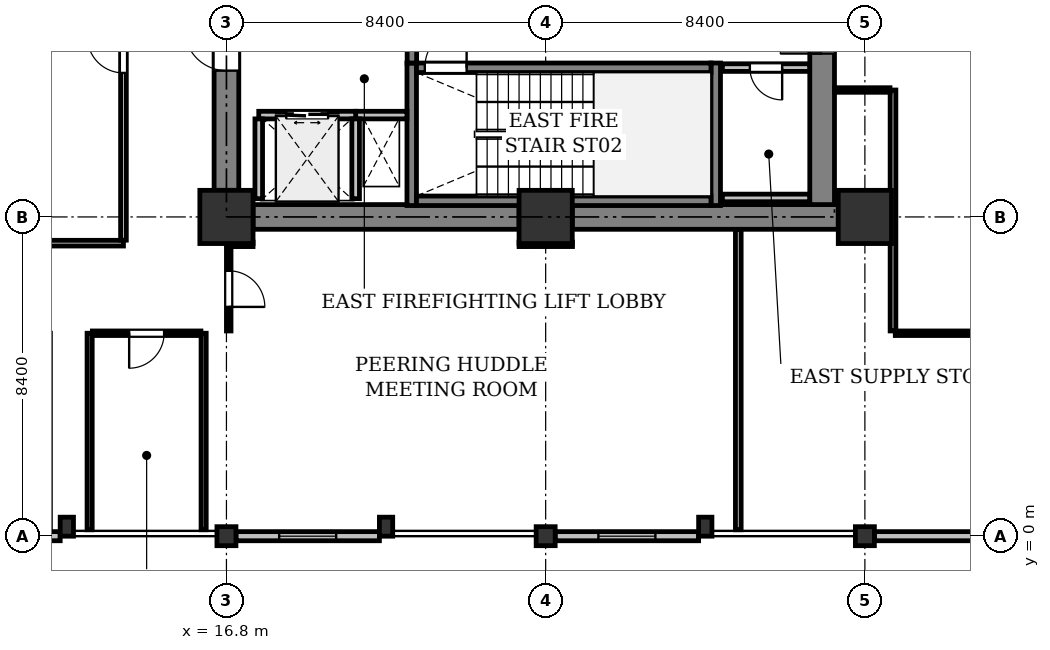
"""IFC4 building model, lengths in metres.
Left out: names, types, materials, properties, quantities, classifications, styles, units other than length and angle.
Written with IfcOpenShell. Run it as: python <this file> out.ifc"""

import sys

from ifc_helpers import new_model, si_unit, direction, frame, frame_2d, origin, origin_2d, place, context, subcontext, project, spatial, rectangle, i_section, extrude, element, fill, save


model = new_model("IFC4")
c1 = context("Model", 3, precision=1e-05, world=origin(), true_north=direction((0.0, 1.0)))
c2 = subcontext(c1, "Body", "Model", "MODEL_VIEW")
j1 = project(units=[si_unit("LENGTHUNIT", "METRE"), si_unit("PLANEANGLEUNIT", "RADIAN")], contexts=[c1])
p1 = place(None, origin())
s1 = spatial("IfcSite", under=j1, at=p1, CompositionType="ELEMENT")
p2 = place(p1, origin())
s2 = spatial("IfcBuilding", under=s1, at=p2, CompositionType="ELEMENT")
p3 = place(p2, frame((0.0, 0.0, 24.8)))
s3 = spatial("IfcBuildingStorey", under=s2, at=p3, CompositionType="ELEMENT", Elevation=24.8)
p4 = place(p3, frame((16.8, 0.0, 0.0), z_axis=(0.0, 0.0, 1.0), x_axis=(1.0, 0.0, 0.0)))
e1 = element("IfcColumn", 1, at=p4, inside=s3, PredefinedType="COLUMN", context=c2, shape_type="SweptSolid", body=[
    extrude(i_section(OverallWidth=0.5, OverallDepth=0.5, WebThickness=0.028, FlangeThickness=0.04, at=origin_2d()), origin(), (0.0, 0.0, 1.0), 4.2),
])
p5 = place(p3, frame((16.8, 8.4, 0.0), z_axis=(0.0, 0.0, 1.0), x_axis=(1.0, 0.0, 0.0)))
e2 = element("IfcColumn", 2, at=p5, inside=s3, PredefinedType="COLUMN", context=c2, shape_type="SweptSolid", body=[
    extrude(rectangle(XDim=1.4, YDim=1.4, at=origin_2d()), origin(), (0.0, 0.0, 1.0), 4.2),
])
p6 = place(p3, frame((25.2, 0.0, 0.0), z_axis=(0.0, 0.0, 1.0), x_axis=(1.0, 0.0, 0.0)))
e3 = element("IfcColumn", 3, at=p6, inside=s3, PredefinedType="COLUMN", context=c2, shape_type="SweptSolid", body=[
    extrude(i_section(OverallWidth=0.5, OverallDepth=0.5, WebThickness=0.028, FlangeThickness=0.04, at=origin_2d()), origin(), (0.0, 0.0, 1.0), 4.2),
])
p7 = place(p3, frame((25.2, 8.4, 0.0), z_axis=(0.0, 0.0, 1.0), x_axis=(1.0, 0.0, 0.0)))
e4 = element("IfcColumn", 4, at=p7, inside=s3, PredefinedType="COLUMN", context=c2, shape_type="SweptSolid", body=[
    extrude(rectangle(XDim=1.4, YDim=1.4, at=origin_2d()), origin(), (0.0, 0.0, 1.0), 4.2),
])
p8 = place(p3, frame((33.6, 0.0, 0.0), z_axis=(0.0, 0.0, 1.0), x_axis=(1.0, 0.0, 0.0)))
e5 = element("IfcColumn", 5, at=p8, inside=s3, PredefinedType="COLUMN", context=c2, shape_type="SweptSolid", body=[
    extrude(i_section(OverallWidth=0.5, OverallDepth=0.5, WebThickness=0.028, FlangeThickness=0.04, at=origin_2d()), origin(), (0.0, 0.0, 1.0), 4.2),
])
p9 = place(p3, frame((33.6, 8.4, 0.0), z_axis=(0.0, 0.0, 1.0), x_axis=(1.0, 0.0, 0.0)))
e6 = element("IfcColumn", 6, at=p9, inside=s3, PredefinedType="COLUMN", context=c2, shape_type="SweptSolid", body=[
    extrude(rectangle(XDim=1.4, YDim=1.4, at=origin_2d()), origin(), (0.0, 0.0, 1.0), 4.2),
])
for number, where, z_axis, x_axis in (
    (7, (12.6, 0.25, 0.0), (0.0, 0.0, 1.0), (1.0, 0.0, 0.0)),
    (8, (21.0, 0.25, 0.0), (0.0, 0.0, 1.0), (1.0, 0.0, 0.0)),
    (9, (29.4, 0.25, 0.0), (0.0, 0.0, 1.0), (1.0, 0.0, 0.0)),
):
    element("IfcColumn", number, at=place(p3, frame(where, z_axis=z_axis, x_axis=x_axis)), inside=s3, PredefinedType="PILASTER", context=c2, shape_type="SweptSolid", body=[
        extrude(rectangle(XDim=0.35, YDim=0.5, at=origin_2d()), origin(), (0.0, 0.0, 1.0), 4.2),
    ])
p10 = place(p3, frame((41.75, 0.0, 0.0), z_axis=(0.0, 0.0, 1.0), x_axis=(-1.0, 0.0, 0.0)))
e10 = element("IfcWall", 10, at=p10, inside=s3, PredefinedType="STANDARD", context=c2, shape_type="SweptSolid", body=[
    extrude(rectangle(XDim=7.9, YDim=0.24, at=frame_2d((3.95, 0.0))), origin(), (0.0, 0.0, 1.0), 3.471),
])
p11 = place(p10, frame((2.43, 0.0, 0.9)))
e11 = element("IfcOpeningElement", 11, at=p11, cuts=e10, PredefinedType="OPENING", context=c2, shape_type="SweptSolid", body=[
    extrude(rectangle(XDim=1.5, YDim=1.6, at=frame_2d((0.75, 0.8))), frame((0.0, 0.13, 0.0), z_axis=(0.0, -1.0, 0.0), x_axis=(1.0, 0.0, 0.0)), (0.0, 0.0, 1.0), 0.26),
])
p12 = place(p3, frame((29.225, 0.0, 0.0), z_axis=(0.0, 0.0, 1.0), x_axis=(-1.0, 0.0, 0.0)))
e12 = element("IfcWall", 12, at=p12, inside=s3, PredefinedType="STANDARD", context=c2, shape_type="SweptSolid", body=[
    extrude(rectangle(XDim=3.775, YDim=0.24, at=frame_2d((1.888, 0.0))), origin(), (0.0, 0.0, 1.0), 3.471),
])
p13 = place(p12, frame((1.137, 0.0, 0.9)))
e13 = element("IfcOpeningElement", 13, at=p13, cuts=e12, PredefinedType="OPENING", context=c2, shape_type="SweptSolid", body=[
    extrude(rectangle(XDim=1.5, YDim=1.6, at=frame_2d((0.75, 0.8))), frame((0.0, 0.13, 0.0), z_axis=(0.0, -1.0, 0.0), x_axis=(1.0, 0.0, 0.0)), (0.0, 0.0, 1.0), 0.26),
])
p14 = place(p3, frame((20.825, 0.0, 0.0), z_axis=(0.0, 0.0, 1.0), x_axis=(-1.0, 0.0, 0.0)))
e14 = element("IfcWall", 14, at=p14, inside=s3, PredefinedType="STANDARD", context=c2, shape_type="SweptSolid", body=[
    extrude(rectangle(XDim=3.775, YDim=0.24, at=frame_2d((1.887, 0.0))), origin(), (0.0, 0.0, 1.0), 3.471),
])
p15 = place(p14, frame((1.137, 0.0, 0.9)))
e15 = element("IfcOpeningElement", 15, at=p15, cuts=e14, PredefinedType="OPENING", context=c2, shape_type="SweptSolid", body=[
    extrude(rectangle(XDim=1.5, YDim=1.6, at=frame_2d((0.75, 0.8))), frame((0.0, 0.13, 0.0), z_axis=(0.0, -1.0, 0.0), x_axis=(1.0, 0.0, 0.0)), (0.0, 0.0, 1.0), 0.26),
])
p16 = place(p3, frame((12.425, 0.0, 0.0), z_axis=(0.0, 0.0, 1.0), x_axis=(-1.0, 0.0, 0.0)))
e16 = element("IfcWall", 16, at=p16, inside=s3, PredefinedType="STANDARD", context=c2, shape_type="SweptSolid", body=[
    extrude(rectangle(XDim=3.775, YDim=0.24, at=frame_2d((1.888, 0.0))), origin(), (0.0, 0.0, 1.0), 3.471),
])
p17 = place(p16, frame((1.137, 0.0, 0.9)))
e17 = element("IfcOpeningElement", 17, at=p17, cuts=e16, PredefinedType="OPENING", context=c2, shape_type="SweptSolid", body=[
    extrude(rectangle(XDim=1.5, YDim=1.6, at=frame_2d((0.75, 0.8))), frame((0.0, 0.13, 0.0), z_axis=(0.0, -1.0, 0.0), x_axis=(1.0, 0.0, 0.0)), (0.0, 0.0, 1.0), 0.26),
])
for number, where, z_axis, x_axis in (
    (18, (17.5, 8.4, 0.0), (0.0, 0.0, 1.0), (1.0, 0.0, 0.0)),
    (19, (25.9, 8.4, 0.0), (0.0, 0.0, 1.0), (1.0, 0.0, 0.0)),
):
    element("IfcWall", number, at=place(p3, frame(where, z_axis=z_axis, x_axis=x_axis)), inside=s3, PredefinedType="SHEAR", context=c2, shape_type="SweptSolid", body=[
        extrude(rectangle(XDim=7.0, YDim=0.65, at=frame_2d((3.5, 0.0))), origin(), (0.0, 0.0, 1.0), 3.925),
    ])
p18 = place(p3, frame((32.475, 8.725, 0.0), z_axis=(0.0, 0.0, 1.0), x_axis=(0.0, 1.0, 0.0)))
e20 = element("IfcWall", 20, at=p18, inside=s3, PredefinedType="SHEAR", context=c2, shape_type="SweptSolid", body=[
    extrude(rectangle(XDim=7.75, YDim=0.65, at=frame_2d((3.875, 0.0))), origin(), (0.0, 0.0, 1.0), 3.925),
])
p19 = place(p18, frame((3.975, 0.0, 0.0)))
e21 = element("IfcOpeningElement", 21, at=p19, cuts=e20, PredefinedType="OPENING", context=c2, shape_type="SweptSolid", body=[
    extrude(rectangle(XDim=1.1, YDim=2.15, at=frame_2d((0.55, 1.075))), frame((0.0, 0.335, 0.0), z_axis=(0.0, -1.0, 0.0), x_axis=(1.0, 0.0, 0.0)), (0.0, 0.0, 1.0), 0.67),
])
p20 = place(p3, frame((16.8, 9.1, 0.0), z_axis=(0.0, 0.0, 1.0), x_axis=(0.0, 1.0, 0.0)))
e22 = element("IfcWall", 22, at=p20, inside=s3, PredefinedType="SHEAR", context=c2, shape_type="SweptSolid", body=[
    extrude(rectangle(XDim=7.0, YDim=0.65, at=frame_2d((3.5, 0.0))), origin(), (0.0, 0.0, 1.0), 3.925),
])
p21 = place(p20, frame((3.15, 0.0, 0.0)))
e23 = element("IfcOpeningElement", 23, at=p21, cuts=e22, PredefinedType="OPENING", context=c2, shape_type="SweptSolid", body=[
    extrude(rectangle(XDim=1.1, YDim=2.15, at=frame_2d((0.55, 1.075))), frame((0.0, 0.335, 0.0), z_axis=(0.0, -1.0, 0.0), x_axis=(1.0, 0.0, 0.0)), (0.0, 0.0, 1.0), 0.67),
])
for number, where, z_axis, x_axis in (
    (24, (21.675, 8.7, 0.0), (0.0, 0.0, 1.0), (0.0, 1.0, 0.0)),
    (25, (29.675, 8.7, 0.0), (0.0, 0.0, 1.0), (0.0, 1.0, 0.0)),
):
    element("IfcWall", number, at=place(p3, frame(where, z_axis=z_axis, x_axis=x_axis)), inside=s3, PredefinedType="SHEAR", context=c2, shape_type="SweptSolid", body=[
        extrude(rectangle(XDim=3.75, YDim=0.25, at=frame_2d((1.875, 0.0))), origin(), (0.0, 0.0, 1.0), 3.925),
    ])
p22 = place(p3, frame((21.8, 8.825, 0.0), z_axis=(0.0, 0.0, 1.0), x_axis=(1.0, 0.0, 0.0)))
e26 = element("IfcWall", 26, at=p22, inside=s3, PredefinedType="SHEAR", context=c2, shape_type="SweptSolid", body=[
    extrude(rectangle(XDim=7.75, YDim=0.25, at=frame_2d((3.875, 0.0))), origin(), (0.0, 0.0, 1.0), 3.925),
])
p23 = place(p3, frame((21.8, 12.325, 0.0), z_axis=(0.0, 0.0, 1.0), x_axis=(1.0, 0.0, 0.0)))
e27 = element("IfcWall", 27, at=p23, inside=s3, PredefinedType="SHEAR", context=c2, shape_type="SweptSolid", body=[
    extrude(rectangle(XDim=7.75, YDim=0.25, at=frame_2d((3.875, 0.0))), origin(), (0.0, 0.0, 1.0), 3.925),
])
p24 = place(p23, frame((0.22, 0.0, 0.0)))
e28 = element("IfcOpeningElement", 28, at=p24, cuts=e27, PredefinedType="OPENING", context=c2, shape_type="SweptSolid", body=[
    extrude(rectangle(XDim=1.1, YDim=2.15, at=frame_2d((0.55, 1.075))), frame((0.0, 0.135, 0.0), z_axis=(0.0, -1.0, 0.0), x_axis=(1.0, 0.0, 0.0)), (0.0, 0.0, 1.0), 0.27),
])
p25 = place(p3, frame((20.2, 11.08, 0.0), z_axis=(0.0, 0.0, 1.0), x_axis=(1.0, 0.0, 0.0)))
e29 = element("IfcWall", 29, at=p25, inside=s3, PredefinedType="PARTITIONING", context=c2, shape_type="SweptSolid", body=[
    extrude(rectangle(XDim=1.35, YDim=0.2, at=frame_2d((0.675, 0.0))), origin(), (0.0, 0.0, 1.0), 3.925),
])
p26 = place(p3, frame((21.68, 12.45, 0.0), z_axis=(0.0, 0.0, 1.0), x_axis=(0.0, 1.0, 0.0)))
e30 = element("IfcWall", 30, at=p26, inside=s3, PredefinedType="SHEAR", context=c2, shape_type="SweptSolid", body=[
    extrude(rectangle(XDim=1.65, YDim=0.25, at=frame_2d((0.825, 0.0))), origin(), (0.0, 0.0, 1.0), 3.925),
])
p27 = place(p26, frame((0.325, 0.0, 0.0)))
e31 = element("IfcOpeningElement", 31, at=p27, cuts=e30, PredefinedType="OPENING", context=c2, shape_type="SweptSolid", body=[
    extrude(rectangle(XDim=1.0, YDim=2.15, at=frame_2d((0.5, 1.075))), frame((0.0, 0.135, 0.0), z_axis=(0.0, -1.0, 0.0), x_axis=(1.0, 0.0, 0.0)), (0.0, 0.0, 1.0), 0.27),
])
p28 = place(p3, frame((17.65, 11.08, 0.0), z_axis=(0.0, 0.0, 1.0), x_axis=(1.0, 0.0, 0.0)))
e32 = element("IfcWall", 32, at=p28, inside=s3, PredefinedType="PARTITIONING", context=c2, shape_type="SweptSolid", body=[
    extrude(rectangle(XDim=2.55, YDim=0.2, at=frame_2d((1.275, 0.0))), origin(), (0.0, 0.0, 1.0), 3.925),
])
p29 = place(p28, frame((0.725, 0.0, 0.0)))
e33 = element("IfcOpeningElement", 33, at=p29, cuts=e32, PredefinedType="OPENING", context=c2, shape_type="SweptSolid", body=[
    extrude(rectangle(XDim=1.1, YDim=2.2, at=frame_2d((0.55, 1.1))), frame((0.0, 0.11, 0.0), z_axis=(0.0, -1.0, 0.0), x_axis=(1.0, 0.0, 0.0)), (0.0, 0.0, 1.0), 0.22),
])
for number, where, z_axis, x_axis in (
    (34, (20.2, 8.88, 0.0), (0.0, 0.0, 1.0), (0.0, 1.0, 0.0)),
    (35, (17.65, 8.88, 0.0), (0.0, 0.0, 1.0), (0.0, 1.0, 0.0)),
):
    element("IfcWall", number, at=place(p3, frame(where, z_axis=z_axis, x_axis=x_axis)), inside=s3, PredefinedType="PARTITIONING", context=c2, shape_type="SweptSolid", body=[
        extrude(rectangle(XDim=2.1, YDim=0.2, at=frame_2d((1.05, 0.0))), origin(), (0.0, 0.0, 1.0), 3.925),
    ])
p30 = place(p3, frame((32.146, 12.33, 0.0), z_axis=(0.0, 0.0, 1.0), x_axis=(-1.0, 0.0, 0.0)))
e36 = element("IfcWall", 36, at=p30, inside=s3, PredefinedType="PARTITIONING", context=c2, shape_type="SweptSolid", body=[
    extrude(rectangle(XDim=2.296, YDim=0.2, at=frame_2d((1.148, 0.0))), origin(), (0.0, 0.0, 1.0), 3.925),
])
p31 = place(p30, frame((0.723, 0.0, 0.0)))
e37 = element("IfcOpeningElement", 37, at=p31, cuts=e36, PredefinedType="OPENING", context=c2, shape_type="SweptSolid", body=[
    extrude(rectangle(XDim=0.85, YDim=2.15, at=frame_2d((0.425, 1.075))), frame((0.0, 0.11, 0.0), z_axis=(0.0, -1.0, 0.0), x_axis=(1.0, 0.0, 0.0)), (0.0, 0.0, 1.0), 0.22),
])
p32 = place(p3, frame((29.85, 8.9, 0.0), z_axis=(0.0, 0.0, 1.0), x_axis=(1.0, 0.0, 0.0)))
e38 = element("IfcWall", 38, at=p32, inside=s3, PredefinedType="PARTITIONING", context=c2, shape_type="SweptSolid", body=[
    extrude(rectangle(XDim=2.296, YDim=0.2, at=frame_2d((1.148, 0.0))), origin(), (0.0, 0.0, 1.0), 3.925),
])
for number, where, z_axis, x_axis in (
    (39, (13.2, 5.34, 0.0), (0.0, 0.0, 1.0), (0.0, -1.0, 0.0)),
    (40, (16.2, 0.169, 0.0), (0.0, 0.0, 1.0), (0.0, 1.0, 0.0)),
):
    element("IfcWall", number, at=place(p3, frame(where, z_axis=z_axis, x_axis=x_axis)), inside=s3, PredefinedType="PARTITIONING", context=c2, shape_type="SweptSolid", body=[
        extrude(rectangle(XDim=5.171, YDim=0.135, at=frame_2d((2.585, 0.0))), origin(), (0.0, 0.0, 1.0), 3.925),
    ])
p33 = place(p3, frame((16.128, 5.34, 0.0), z_axis=(0.0, 0.0, 1.0), x_axis=(-1.0, 0.0, 0.0)))
e41 = element("IfcWall", 41, at=p33, inside=s3, PredefinedType="PARTITIONING", context=c2, shape_type="SweptSolid", body=[
    extrude(rectangle(XDim=2.857, YDim=0.12, at=frame_2d((1.428, 0.0))), origin(), (0.0, 0.0, 1.0), 3.925),
])
p34 = place(p33, frame((0.969, 0.0, 0.0)))
e42 = element("IfcOpeningElement", 42, at=p34, cuts=e41, PredefinedType="OPENING", context=c2, shape_type="SweptSolid", body=[
    extrude(rectangle(XDim=0.92, YDim=2.1, at=frame_2d((0.46, 1.05))), frame((0.0, 0.07, 0.0), z_axis=(0.0, -1.0, 0.0), x_axis=(1.0, 0.0, 0.0)), (0.0, 0.0, 1.0), 0.14),
])
p35 = place(p3, frame((35.36, 0.124, 0.0), z_axis=(0.0, 0.0, 1.0), x_axis=(0.0, 1.0, 0.0)))
e43 = element("IfcWall", 43, at=p35, inside=s3, PredefinedType="PARTITIONING", context=c2, shape_type="SweptSolid", body=[
    extrude(rectangle(XDim=5.216, YDim=0.135, at=frame_2d((2.608, 0.0))), origin(), (0.0, 0.0, 1.0), 3.925),
])
p36 = place(p3, frame((35.289, 5.34, 0.0), z_axis=(0.0, 0.0, 1.0), x_axis=(-1.0, 0.0, 0.0)))
e44 = element("IfcWall", 44, at=p36, inside=s3, PredefinedType="PARTITIONING", context=c2, shape_type="SweptSolid", body=[
    extrude(rectangle(XDim=0.889, YDim=0.12, at=frame_2d((0.444, 0.0))), origin(), (0.0, 0.0, 1.0), 3.925),
])
p37 = place(p3, frame((34.34, 5.4, 0.0), z_axis=(0.0, 0.0, 1.0), x_axis=(0.0, 1.0, 0.0)))
e45 = element("IfcWall", 45, at=p37, inside=s3, PredefinedType="PARTITIONING", context=c2, shape_type="SweptSolid", body=[
    extrude(rectangle(XDim=6.34, YDim=0.15, at=frame_2d((3.17, 0.0))), origin(), (0.0, 0.0, 1.0), 3.313),
])
p38 = place(p37, frame((1.173, 0.0, 0.0)))
e46 = element("IfcOpeningElement", 46, at=p38, cuts=e45, PredefinedType="OPENING", context=c2, shape_type="SweptSolid", body=[
    extrude(rectangle(XDim=0.95, YDim=2.15, at=frame_2d((0.475, 1.075))), frame((0.0, 0.085, 0.0), z_axis=(0.0, -1.0, 0.0), x_axis=(1.0, 0.0, 0.0)), (0.0, 0.0, 1.0), 0.17),
])
p39 = place(p3, frame((34.261, 11.74, 0.0), z_axis=(0.0, 0.0, 1.0), x_axis=(-1.0, 0.0, 0.0)))
e47 = element("IfcWall", 47, at=p39, inside=s3, PredefinedType="PARTITIONING", context=c2, shape_type="SweptSolid", body=[
    extrude(rectangle(XDim=1.457, YDim=0.12, at=frame_2d((0.729, 0.0))), origin(), (0.0, 0.0, 1.0), 3.323),
])
p40 = place(p3, frame((25.906, 7.681, 0.0), z_axis=(0.0, 0.0, 1.0), x_axis=(-0.999999758706, -0.000694685487, 0.0)))
e48 = element("IfcWall", 48, at=p40, inside=s3, PredefinedType="PARTITIONING", context=c2, shape_type="SweptSolid", body=[
    extrude(rectangle(XDim=1.406, YDim=0.12, at=frame_2d((0.703, 0.0))), origin(), (0.0, 0.0, 1.0), 3.323),
])
p41 = place(p3, frame((17.5, 7.68, 0.0), z_axis=(0.0, 0.0, 1.0), x_axis=(-1.0, 0.0, 0.0)))
e49 = element("IfcWall", 49, at=p41, inside=s3, PredefinedType="PARTITIONING", context=c2, shape_type="SweptSolid", body=[
    extrude(rectangle(XDim=0.64, YDim=0.12, at=frame_2d((0.32, 0.0))), origin(), (0.0, 0.0, 1.0), 3.323),
])
p42 = place(p3, frame((16.86, 7.616, 0.0), z_axis=(0.0, 0.0, 1.0), x_axis=(0.0, -1.0, 0.0)))
e50 = element("IfcWall", 50, at=p42, inside=s3, PredefinedType="PARTITIONING", context=c2, shape_type="SweptSolid", body=[
    extrude(rectangle(XDim=2.216, YDim=0.12, at=frame_2d((1.108, 0.0))), origin(), (0.0, 0.0, 1.0), 3.323),
])
p43 = place(p3, frame((36.65, 5.34, 0.0), z_axis=(0.0, 0.0, 1.0), x_axis=(-1.0, 0.0, 0.0)))
e51 = element("IfcWall", 51, at=p43, inside=s3, PredefinedType="PARTITIONING", context=c2, shape_type="SweptSolid", body=[
    extrude(rectangle(XDim=1.169, YDim=0.2, at=frame_2d((0.585, 0.0))), origin(), (0.0, 0.0, 1.0), 3.925),
])
p44 = place(p3, frame((14.09, 5.46, 0.0), z_axis=(0.0, 0.0, 1.0), x_axis=(0.0, 1.0, 0.0)))
e52 = element("IfcWall", 52, at=p44, inside=s3, PredefinedType="PARTITIONING", context=c2, shape_type="SweptSolid", body=[
    extrude(rectangle(XDim=12.08, YDim=0.15, at=frame_2d((6.04, 0.0))), origin(), (0.0, 0.0, 1.0), 3.313),
])
p45 = place(p44, frame((5.565, 0.0, 0.0)))
e53 = element("IfcOpeningElement", 53, at=p45, cuts=e52, PredefinedType="OPENING", context=c2, shape_type="SweptSolid", body=[
    extrude(rectangle(XDim=0.95, YDim=2.15, at=frame_2d((0.475, 1.075))), frame((0.0, 0.085, 0.0), z_axis=(0.0, -1.0, 0.0), x_axis=(1.0, 0.0, 0.0)), (0.0, 0.0, 1.0), 0.17),
])
p46 = place(p13, origin())
e54 = element("IfcWindow", 54, at=p46, inside=s3, PartitioningType="SINGLE_PANEL", PredefinedType="WINDOW", context=c2, shape_type="SweptSolid", body=[
    extrude(rectangle(XDim=1.5, YDim=1.6, at=frame_2d((0.75, 0.8))), frame((0.0, 0.03, 0.0), z_axis=(0.0, -1.0, 0.0), x_axis=(1.0, 0.0, 0.0)), (0.0, 0.0, 1.0), 0.06),
])
fill(e13, e54)
p47 = place(p15, origin())
e55 = element("IfcWindow", 55, at=p47, inside=s3, PartitioningType="SINGLE_PANEL", PredefinedType="WINDOW", context=c2, shape_type="SweptSolid", body=[
    extrude(rectangle(XDim=1.5, YDim=1.6, at=frame_2d((0.75, 0.8))), frame((0.0, 0.03, 0.0), z_axis=(0.0, -1.0, 0.0), x_axis=(1.0, 0.0, 0.0)), (0.0, 0.0, 1.0), 0.06),
])
fill(e15, e55)
p48 = place(p19, origin())
e56 = element("IfcDoor", 56, at=p48, inside=s3, OperationType="SINGLE_SWING_RIGHT", PredefinedType="DOOR", context=c2, shape_type="SweptSolid", body=[
    extrude(rectangle(XDim=1.1, YDim=2.15, at=frame_2d((0.55, 1.075))), frame((0.0, 0.025, 0.0), z_axis=(0.0, -1.0, 0.0), x_axis=(1.0, 0.0, 0.0)), (0.0, 0.0, 1.0), 0.05),
])
fill(e21, e56)
p49 = place(p21, origin())
e57 = element("IfcDoor", 57, at=p49, inside=s3, OperationType="SINGLE_SWING_LEFT", PredefinedType="DOOR", context=c2, shape_type="SweptSolid", body=[
    extrude(rectangle(XDim=1.1, YDim=2.15, at=frame_2d((0.55, 1.075))), frame((0.0, 0.025, 0.0), z_axis=(0.0, -1.0, 0.0), x_axis=(1.0, 0.0, 0.0)), (0.0, 0.0, 1.0), 0.05),
])
fill(e23, e57)
p50 = place(p24, origin())
e58 = element("IfcDoor", 58, at=p50, inside=s3, OperationType="SINGLE_SWING_LEFT", PredefinedType="DOOR", context=c2, shape_type="SweptSolid", body=[
    extrude(rectangle(XDim=1.1, YDim=2.15, at=frame_2d((0.55, 1.075))), frame((0.0, 0.025, 0.0), z_axis=(0.0, -1.0, 0.0), x_axis=(1.0, 0.0, 0.0)), (0.0, 0.0, 1.0), 0.05),
])
fill(e28, e58)
p51 = place(p29, origin())
e59 = element("IfcDoor", 59, at=p51, inside=s3, OperationType="DOUBLE_DOOR_SLIDING", PredefinedType="DOOR", context=c2, shape_type="SweptSolid", body=[
    extrude(rectangle(XDim=1.1, YDim=2.2, at=frame_2d((0.55, 1.1))), frame((0.0, 0.025, 0.0), z_axis=(0.0, -1.0, 0.0), x_axis=(1.0, 0.0, 0.0)), (0.0, 0.0, 1.0), 0.05),
])
fill(e33, e59)
p52 = place(p31, origin())
e60 = element("IfcDoor", 60, at=p52, inside=s3, OperationType="SINGLE_SWING_LEFT", PredefinedType="DOOR", context=c2, shape_type="SweptSolid", body=[
    extrude(rectangle(XDim=0.85, YDim=2.15, at=frame_2d((0.425, 1.075))), frame((0.0, 0.025, 0.0), z_axis=(0.0, -1.0, 0.0), x_axis=(1.0, 0.0, 0.0)), (0.0, 0.0, 1.0), 0.05),
])
fill(e37, e60)
p53 = place(p34, origin())
e61 = element("IfcDoor", 61, at=p53, inside=s3, OperationType="SINGLE_SWING_RIGHT", PredefinedType="DOOR", context=c2, shape_type="SweptSolid", body=[
    extrude(rectangle(XDim=0.92, YDim=2.1, at=frame_2d((0.46, 1.05))), frame((0.0, 0.025, 0.0), z_axis=(0.0, -1.0, 0.0), x_axis=(1.0, 0.0, 0.0)), (0.0, 0.0, 1.0), 0.05),
])
fill(e42, e61)
p54 = place(p38, origin())
e62 = element("IfcDoor", 62, at=p54, inside=s3, OperationType="SINGLE_SWING_LEFT", PredefinedType="DOOR", context=c2, shape_type="SweptSolid", body=[
    extrude(rectangle(XDim=0.95, YDim=2.15, at=frame_2d((0.475, 1.075))), frame((0.0, 0.025, 0.0), z_axis=(0.0, -1.0, 0.0), x_axis=(1.0, 0.0, 0.0)), (0.0, 0.0, 1.0), 0.05),
])
fill(e46, e62)
p55 = place(p45, origin())
e63 = element("IfcDoor", 63, at=p55, inside=s3, OperationType="SINGLE_SWING_RIGHT", PredefinedType="DOOR", context=c2, shape_type="SweptSolid", body=[
    extrude(rectangle(XDim=0.95, YDim=2.15, at=frame_2d((0.475, 1.075))), frame((0.0, 0.025, 0.0), z_axis=(0.0, -1.0, 0.0), x_axis=(1.0, 0.0, 0.0)), (0.0, 0.0, 1.0), 0.05),
])
fill(e53, e63)
save(model, sys.argv[1])
